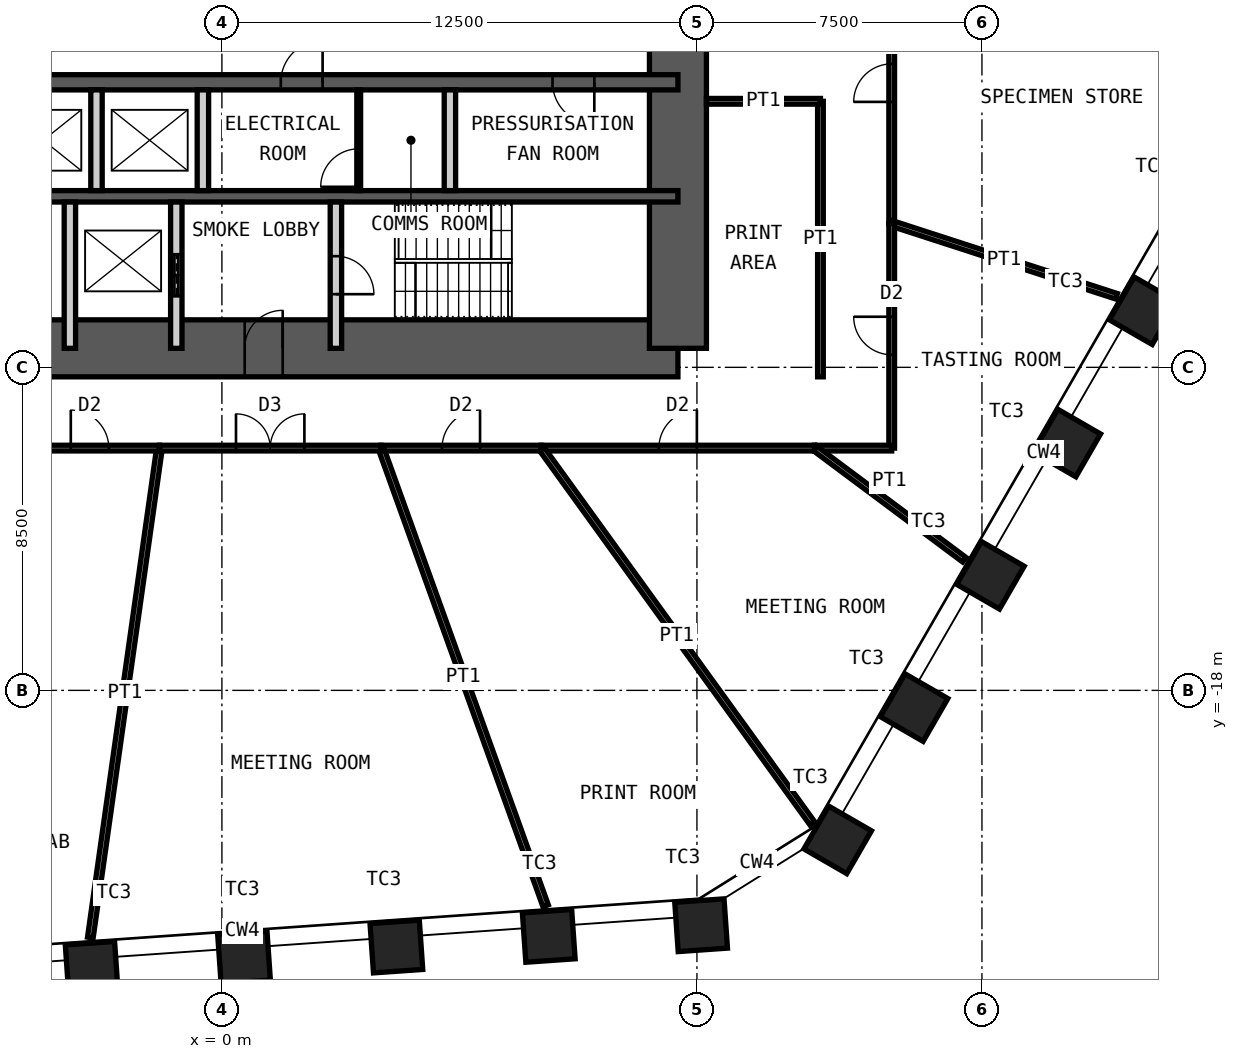
"""IFC4 building model, lengths in metres.
Left out: names, types, materials, properties, quantities, classifications, styles, units other than length and angle.
Written with IfcOpenShell. Run it as: python <this file> out.ifc"""

import sys

from ifc_helpers import new_model, si_unit, direction, frame, frame_2d, origin, origin_2d, place, context, subcontext, project, spatial, rectangle, hollow_rectangle, extrude, element, fill, save


model = new_model("IFC4")
c1 = context("Model", 3, precision=1e-05, world=origin(), true_north=direction((0.0, 1.0)))
c2 = subcontext(c1, "Body", "Model", "MODEL_VIEW")
j1 = project(units=[si_unit("LENGTHUNIT", "METRE"), si_unit("PLANEANGLEUNIT", "RADIAN")], contexts=[c1])
p1 = place(None, origin())
s1 = spatial("IfcSite", under=j1, at=p1, CompositionType="ELEMENT")
p2 = place(p1, origin())
s2 = spatial("IfcBuilding", under=s1, at=p2, CompositionType="ELEMENT")
p3 = place(p2, frame((0.0, 0.0, 124.0)))
s3 = spatial("IfcBuildingStorey", under=s2, at=p3, CompositionType="ELEMENT", Elevation=124.0)
for number, where, z_axis, x_axis in (
    (1, (24.242, -8.011, 0.0), (0.0, 0.0, 1.0), (0.5, 0.866, 0.0)),
    (2, (22.233, -11.491, 0.0), (0.0, 0.0, 1.0), (0.5, 0.866, 0.0)),
    (3, (20.223, -14.972, 0.0), (0.0, 0.0, 1.0), (0.5, 0.866, 0.0)),
    (4, (18.214, -18.453, 0.0), (0.0, 0.0, 1.0), (0.5, 0.866, 0.0)),
    (5, (16.204, -21.933, 0.0), (0.0, 0.0, 1.0), (0.5, 0.866, 0.0)),
    (6, (12.61, -24.179, 0.0), (0.0, 0.0, 1.0), (0.998, 0.07, 0.0)),
    (7, (8.601, -24.46, 0.0), (0.0, 0.0, 1.0), (0.998, 0.07, 0.0)),
    (8, (4.592, -24.74, 0.0), (0.0, 0.0, 1.0), (0.998, 0.07, 0.0)),
    (9, (0.582, -25.02, 0.0), (0.0, 0.0, 1.0), (0.998, 0.07, 0.0)),
    (10, (-3.427, -25.301, 0.0), (0.0, 0.0, 1.0), (0.998, 0.07, 0.0)),
):
    element("IfcColumn", number, at=place(p3, frame(where, z_axis=z_axis, x_axis=x_axis)), inside=s3, PredefinedType="COLUMN", context=c2, shape_type="SweptSolid", body=[
        extrude(hollow_rectangle(XDim=1.3, YDim=1.3, WallThickness=0.1, at=origin_2d()), origin(), (0.0, 0.0, 1.0), 4.2),
    ])
p4 = place(p3, frame((-12.0, -9.0, 0.0), z_axis=(0.0, 0.0, 1.0), x_axis=(1.0, 0.0, 0.0)))
e11 = element("IfcWall", 11, at=p4, inside=s3, PredefinedType="SHEAR", context=c2, shape_type="SweptSolid", body=[
    extrude(rectangle(XDim=24.0, YDim=1.5, at=frame_2d((12.0, 0.0))), origin(), (0.0, 0.0, 1.0), 4.2),
])
p5 = place(p4, frame((1.35, 0.0, 0.0)))
e12 = element("IfcOpeningElement", 12, at=p5, cuts=e11, PredefinedType="OPENING", context=c2, shape_type="SweptSolid", body=[
    extrude(rectangle(XDim=1.0, YDim=2.1, at=frame_2d((0.5, 1.05))), frame((0.0, 0.76, 0.0), z_axis=(0.0, -1.0, 0.0), x_axis=(1.0, 0.0, 0.0)), (0.0, 0.0, 1.0), 1.52),
])
p6 = place(p4, frame((5.325, 0.0, 0.0)))
e13 = element("IfcOpeningElement", 13, at=p6, cuts=e11, PredefinedType="OPENING", context=c2, shape_type="SweptSolid", body=[
    extrude(rectangle(XDim=1.15, YDim=2.1, at=frame_2d((0.575, 1.05))), frame((0.0, 0.76, 0.0), z_axis=(0.0, -1.0, 0.0), x_axis=(1.0, 0.0, 0.0)), (0.0, 0.0, 1.0), 1.52),
])
p7 = place(p4, frame((12.6, 0.0, 0.0)))
e14 = element("IfcOpeningElement", 14, at=p7, cuts=e11, PredefinedType="OPENING", context=c2, shape_type="SweptSolid", body=[
    extrude(rectangle(XDim=1.0, YDim=2.1, at=frame_2d((0.5, 1.05))), frame((0.0, 0.76, 0.0), z_axis=(0.0, -1.0, 0.0), x_axis=(1.0, 0.0, 0.0)), (0.0, 0.0, 1.0), 1.52),
])
p8 = place(p3, frame((12.0, -9.0, 0.0), z_axis=(0.0, 0.0, 1.0), x_axis=(0.0, 1.0, 0.0)))
e15 = element("IfcWall", 15, at=p8, inside=s3, PredefinedType="SHEAR", context=c2, shape_type="SweptSolid", body=[
    extrude(rectangle(XDim=18.0, YDim=1.5, at=frame_2d((9.0, 0.0))), origin(), (0.0, 0.0, 1.0), 4.2),
])
p9 = place(p8, frame((8.1, 0.0, 0.0)))
e16 = element("IfcOpeningElement", 16, at=p9, cuts=e15, PredefinedType="OPENING", context=c2, shape_type="SweptSolid", body=[
    extrude(rectangle(XDim=1.8, YDim=2.1, at=frame_2d((0.9, 1.05))), frame((0.0, 0.76, 0.0), z_axis=(0.0, -1.0, 0.0), x_axis=(1.0, 0.0, 0.0)), (0.0, 0.0, 1.0), 1.52),
])
p10 = place(p3, frame((-12.0, -2.0, 0.0), z_axis=(0.0, 0.0, 1.0), x_axis=(1.0, 0.0, 0.0)))
e17 = element("IfcWall", 17, at=p10, inside=s3, PredefinedType="SHEAR", context=c2, shape_type="SweptSolid", body=[
    extrude(rectangle(XDim=24.0, YDim=0.4, at=frame_2d((12.0, 0.0))), origin(), (0.0, 0.0, 1.0), 4.2),
])
p11 = place(p10, frame((1.1, 0.0, 0.0)))
e18 = element("IfcOpeningElement", 18, at=p11, cuts=e17, PredefinedType="OPENING", context=c2, shape_type="SweptSolid", body=[
    extrude(rectangle(XDim=1.1, YDim=2.1, at=frame_2d((0.55, 1.05))), frame((0.0, 0.21, 0.0), z_axis=(0.0, -1.0, 0.0), x_axis=(1.0, 0.0, 0.0)), (0.0, 0.0, 1.0), 0.42),
])
p12 = place(p10, frame((13.55, 0.0, 0.0)))
e19 = element("IfcOpeningElement", 19, at=p12, cuts=e17, PredefinedType="OPENING", context=c2, shape_type="SweptSolid", body=[
    extrude(rectangle(XDim=1.1, YDim=2.1, at=frame_2d((0.55, 1.05))), frame((0.0, 0.21, 0.0), z_axis=(0.0, -1.0, 0.0), x_axis=(1.0, 0.0, 0.0)), (0.0, 0.0, 1.0), 0.42),
])
p13 = place(p10, frame((20.7, 0.0, 0.0)))
e20 = element("IfcOpeningElement", 20, at=p13, cuts=e17, PredefinedType="OPENING", context=c2, shape_type="SweptSolid", body=[
    extrude(rectangle(XDim=1.1, YDim=2.1, at=frame_2d((0.55, 1.05))), frame((0.0, 0.21, 0.0), z_axis=(0.0, -1.0, 0.0), x_axis=(1.0, 0.0, 0.0)), (0.0, 0.0, 1.0), 0.42),
])
p14 = place(p10, frame((4.0, 0.0, 0.0)))
e21 = element("IfcOpeningElement", 21, at=p14, cuts=e17, PredefinedType="OPENING", context=c2, shape_type="SweptSolid", body=[
    extrude(rectangle(XDim=1.0, YDim=2.1, at=frame_2d((0.5, 1.05))), frame((0.0, 0.21, 0.0), z_axis=(0.0, -1.0, 0.0), x_axis=(1.0, 0.0, 0.0)), (0.0, 0.0, 1.0), 0.42),
])
p15 = place(p3, frame((-12.0, -5.0, 0.0), z_axis=(0.0, 0.0, 1.0), x_axis=(1.0, 0.0, 0.0)))
e22 = element("IfcWall", 22, at=p15, inside=s3, PredefinedType="SHEAR", context=c2, shape_type="SweptSolid", body=[
    extrude(rectangle(XDim=24.0, YDim=0.3, at=frame_2d((12.0, 0.0))), origin(), (0.0, 0.0, 1.0), 4.2),
])
for number, where, z_axis, x_axis in (
    (23, (-3.3, -4.85, 0.0), (0.0, 0.0, 1.0), (0.0, 1.0, 0.0)),
    (24, (-0.5, -4.85, 0.0), (0.0, 0.0, 1.0), (0.0, 1.0, 0.0)),
    (25, (6.0, -4.85, 0.0), (0.0, 0.0, 1.0), (0.0, 1.0, 0.0)),
):
    element("IfcWall", number, at=place(p3, frame(where, z_axis=z_axis, x_axis=x_axis)), inside=s3, PredefinedType="PARTITIONING", context=c2, shape_type="SweptSolid", body=[
        extrude(rectangle(XDim=2.65, YDim=0.3, at=frame_2d((1.325, 0.0))), origin(), (0.0, 0.0, 1.0), 3.98),
    ])
p16 = place(p3, frame((-4.0, -9.0, 0.0), z_axis=(0.0, 0.0, 1.0), x_axis=(0.0, 1.0, 0.0)))
e26 = element("IfcWall", 26, at=p16, inside=s3, PredefinedType="PARTITIONING", context=c2, shape_type="SweptSolid", body=[
    extrude(rectangle(XDim=3.85, YDim=0.3, at=frame_2d((1.925, 0.0))), origin(), (0.0, 0.0, 1.0), 3.98),
])
p17 = place(p3, frame((-1.2, -9.0, 0.0), z_axis=(0.0, 0.0, 1.0), x_axis=(0.0, 1.0, 0.0)))
e27 = element("IfcWall", 27, at=p17, inside=s3, PredefinedType="PARTITIONING", context=c2, shape_type="SweptSolid", body=[
    extrude(rectangle(XDim=3.85, YDim=0.3, at=frame_2d((1.925, 0.0))), origin(), (0.0, 0.0, 1.0), 3.98),
])
p18 = place(p17, frame((1.375, 0.0, 0.0)))
e28 = element("IfcOpeningElement", 28, at=p18, cuts=e27, PredefinedType="OPENING", context=c2, shape_type="SweptSolid", body=[
    extrude(rectangle(XDim=1.1, YDim=2.4, at=frame_2d((0.55, 1.2))), frame((0.0, 0.16, 0.0), z_axis=(0.0, -1.0, 0.0), x_axis=(1.0, 0.0, 0.0)), (0.0, 0.0, 1.0), 0.32),
])
p19 = place(p3, frame((3.0, -9.0, 0.0), z_axis=(0.0, 0.0, 1.0), x_axis=(0.0, 1.0, 0.0)))
e29 = element("IfcWall", 29, at=p19, inside=s3, PredefinedType="PARTITIONING", context=c2, shape_type="SweptSolid", body=[
    extrude(rectangle(XDim=3.85, YDim=0.3, at=frame_2d((1.925, 0.0))), origin(), (0.0, 0.0, 1.0), 3.98),
])
p20 = place(p19, frame((1.425, 0.0, 0.0)))
e30 = element("IfcOpeningElement", 30, at=p20, cuts=e29, PredefinedType="OPENING", context=c2, shape_type="SweptSolid", body=[
    extrude(rectangle(XDim=1.0, YDim=2.1, at=frame_2d((0.5, 1.05))), frame((0.0, 0.16, 0.0), z_axis=(0.0, -1.0, 0.0), x_axis=(1.0, 0.0, 0.0)), (0.0, 0.0, 1.0), 0.32),
])
p21 = place(p3, frame((3.6, -4.85, 0.0), z_axis=(0.0, 0.0, 1.0), x_axis=(0.0, 1.0, 0.0)))
e31 = element("IfcWall", 31, at=p21, inside=s3, PredefinedType="PARTITIONING", context=c2, shape_type="SweptSolid", body=[
    extrude(rectangle(XDim=2.65, YDim=0.1, at=frame_2d((1.325, 0.0))), origin(), (0.0, 0.0, 1.0), 3.98),
])
p22 = place(p21, frame((0.1, 0.0, 0.0)))
e32 = element("IfcOpeningElement", 32, at=p22, cuts=e31, PredefinedType="OPENING", context=c2, shape_type="SweptSolid", body=[
    extrude(rectangle(XDim=1.0, YDim=2.4, at=frame_2d((0.5, 1.2))), frame((0.0, 0.06, 0.0), z_axis=(0.0, -1.0, 0.0), x_axis=(1.0, 0.0, 0.0)), (0.0, 0.0, 1.0), 0.12),
])
p23 = place(p3, frame((-3.462, -24.503, 0.0), z_axis=(0.0, 0.0, 1.0), x_axis=(0.139899618934, 0.990165691499, 0.0)))
e33 = element("IfcWall", 33, at=p23, inside=s3, PredefinedType="PARTITIONING", context=c2, shape_type="SweptSolid", body=[
    extrude(rectangle(XDim=13.006, YDim=0.15, at=frame_2d((6.503, 0.0))), origin(), (0.0, 0.0, 1.0), 3.33),
])
p24 = place(p3, frame((-1.642, -11.625, 0.0), z_axis=(0.0, 0.0, 1.0), x_axis=(-1.0, 0.0, 0.0)))
e34 = element("IfcWall", 34, at=p24, inside=s3, PredefinedType="PARTITIONING", context=c2, shape_type="SweptSolid", body=[
    extrude(rectangle(XDim=3.668, YDim=0.15, at=frame_2d((1.834, 0.0))), origin(), (0.0, 0.0, 1.0), 4.03),
])
p25 = place(p24, frame((1.334, 0.0, 0.0)))
e35 = element("IfcOpeningElement", 35, at=p25, cuts=e34, PredefinedType="OPENING", context=c2, shape_type="SweptSolid", body=[
    extrude(rectangle(XDim=1.0, YDim=2.4, at=frame_2d((0.5, 1.2))), frame((0.0, 0.085, 0.0), z_axis=(0.0, -1.0, 0.0), x_axis=(1.0, 0.0, 0.0)), (0.0, 0.0, 1.0), 0.17),
])
p26 = place(p3, frame((17.625, 1.681, 0.0), z_axis=(0.0, 0.0, 1.0), x_axis=(0.0, -1.0, 0.0)))
e36 = element("IfcWall", 36, at=p26, inside=s3, PredefinedType="PARTITIONING", context=c2, shape_type="SweptSolid", body=[
    extrude(rectangle(XDim=7.394, YDim=0.15, at=frame_2d((3.697, 0.0))), origin(), (0.0, 0.0, 1.0), 4.03),
])
p27 = place(p26, frame((3.197, 0.0, 0.0)))
e37 = element("IfcOpeningElement", 37, at=p27, cuts=e36, PredefinedType="OPENING", context=c2, shape_type="SweptSolid", body=[
    extrude(rectangle(XDim=1.0, YDim=2.4, at=frame_2d((0.5, 1.2))), frame((0.0, 0.085, 0.0), z_axis=(0.0, -1.0, 0.0), x_axis=(1.0, 0.0, 0.0)), (0.0, 0.0, 1.0), 0.17),
])
p28 = place(p3, frame((23.541, -7.63, 0.0), z_axis=(0.0, 0.0, 1.0), x_axis=(-0.951280715006, 0.308326128081, 0.0)))
e38 = element("IfcWall", 38, at=p28, inside=s3, PredefinedType="PARTITIONING", context=c2, shape_type="SweptSolid", body=[
    extrude(rectangle(XDim=6.219, YDim=0.15, at=frame_2d((3.109, 0.0))), origin(), (0.0, 0.0, 1.0), 3.33),
])
p29 = place(p3, frame((17.625, -5.713, 0.0), z_axis=(0.0, 0.0, 1.0), x_axis=(0.0, -1.0, 0.0)))
e39 = element("IfcWall", 39, at=p29, inside=s3, PredefinedType="PARTITIONING", context=c2, shape_type="SweptSolid", body=[
    extrude(rectangle(XDim=5.912, YDim=0.15, at=frame_2d((2.956, 0.0))), origin(), (0.0, 0.0, 1.0), 4.03),
])
p30 = place(p29, frame((2.456, 0.0, 0.0)))
e40 = element("IfcOpeningElement", 40, at=p30, cuts=e39, PredefinedType="OPENING", context=c2, shape_type="SweptSolid", body=[
    extrude(rectangle(XDim=1.0, YDim=2.4, at=frame_2d((0.5, 1.2))), frame((0.0, 0.085, 0.0), z_axis=(0.0, -1.0, 0.0), x_axis=(1.0, 0.0, 0.0)), (0.0, 0.0, 1.0), 0.17),
])
p31 = place(p3, frame((17.625, -11.625, 0.0), z_axis=(0.0, 0.0, 1.0), x_axis=(-1.0, 0.0, 0.0)))
e41 = element("IfcWall", 41, at=p31, inside=s3, PredefinedType="PARTITIONING", context=c2, shape_type="SweptSolid", body=[
    extrude(rectangle(XDim=2.029, YDim=0.15, at=frame_2d((1.014, 0.0))), origin(), (0.0, 0.0, 1.0), 4.03),
])
p32 = place(p3, frame((19.537, -14.562, 0.0), z_axis=(0.0, 0.0, 1.0), x_axis=(-0.801778753003, 0.597620976233, 0.0)))
e42 = element("IfcWall", 42, at=p32, inside=s3, PredefinedType="PARTITIONING", context=c2, shape_type="SweptSolid", body=[
    extrude(rectangle(XDim=4.915, YDim=0.15, at=frame_2d((2.458, 0.0))), origin(), (0.0, 0.0, 1.0), 3.33),
])
p33 = place(p3, frame((15.596, -11.625, 0.0), z_axis=(0.0, 0.0, 1.0), x_axis=(-1.0, 0.0, 0.0)))
e43 = element("IfcWall", 43, at=p33, inside=s3, PredefinedType="PARTITIONING", context=c2, shape_type="SweptSolid", body=[
    extrude(rectangle(XDim=7.195, YDim=0.15, at=frame_2d((3.597, 0.0))), origin(), (0.0, 0.0, 1.0), 4.03),
])
p34 = place(p33, frame((3.097, 0.0, 0.0)))
e44 = element("IfcOpeningElement", 44, at=p34, cuts=e43, PredefinedType="OPENING", context=c2, shape_type="SweptSolid", body=[
    extrude(rectangle(XDim=1.0, YDim=2.4, at=frame_2d((0.5, 1.2))), frame((0.0, 0.085, 0.0), z_axis=(0.0, -1.0, 0.0), x_axis=(1.0, 0.0, 0.0)), (0.0, 0.0, 1.0), 0.17),
])
p35 = place(p3, frame((15.54, -21.502, 0.0), z_axis=(0.0, 0.0, 1.0), x_axis=(-0.585731902034, 0.810504866697, 0.0)))
e45 = element("IfcWall", 45, at=p35, inside=s3, PredefinedType="PARTITIONING", context=c2, shape_type="SweptSolid", body=[
    extrude(rectangle(XDim=12.187, YDim=0.15, at=frame_2d((6.093, 0.0))), origin(), (0.0, 0.0, 1.0), 2.93),
])
p36 = place(p3, frame((8.401, -11.625, 0.0), z_axis=(0.0, 0.0, 1.0), x_axis=(-1.0, 0.0, 0.0)))
e46 = element("IfcWall", 46, at=p36, inside=s3, PredefinedType="PARTITIONING", context=c2, shape_type="SweptSolid", body=[
    extrude(rectangle(XDim=4.217, YDim=0.15, at=frame_2d((2.109, 0.0))), origin(), (0.0, 0.0, 1.0), 4.03),
])
p37 = place(p36, frame((1.609, 0.0, 0.0)))
e47 = element("IfcOpeningElement", 47, at=p37, cuts=e46, PredefinedType="OPENING", context=c2, shape_type="SweptSolid", body=[
    extrude(rectangle(XDim=1.0, YDim=2.4, at=frame_2d((0.5, 1.2))), frame((0.0, 0.085, 0.0), z_axis=(0.0, -1.0, 0.0), x_axis=(1.0, 0.0, 0.0)), (0.0, 0.0, 1.0), 0.17),
])
p38 = place(p3, frame((8.518, -23.667, 0.0), z_axis=(0.0, 0.0, 1.0), x_axis=(-0.338635030469, 0.940917805198, 0.0)))
e48 = element("IfcWall", 48, at=p38, inside=s3, PredefinedType="PARTITIONING", context=c2, shape_type="SweptSolid", body=[
    extrude(rectangle(XDim=12.798, YDim=0.15, at=frame_2d((6.399, 0.0))), origin(), (0.0, 0.0, 1.0), 3.33),
])
p39 = place(p3, frame((4.184, -11.625, 0.0), z_axis=(0.0, 0.0, 1.0), x_axis=(-1.0, 0.0, 0.0)))
e49 = element("IfcWall", 49, at=p39, inside=s3, PredefinedType="PARTITIONING", context=c2, shape_type="SweptSolid", body=[
    extrude(rectangle(XDim=5.826, YDim=0.15, at=frame_2d((2.913, 0.0))), origin(), (0.0, 0.0, 1.0), 4.03),
])
p40 = place(p39, frame((2.013, 0.0, 0.0)))
e50 = element("IfcOpeningElement", 50, at=p40, cuts=e49, PredefinedType="OPENING", context=c2, shape_type="SweptSolid", body=[
    extrude(rectangle(XDim=1.8, YDim=2.4, at=frame_2d((0.9, 1.2))), frame((0.0, 0.085, 0.0), z_axis=(0.0, -1.0, 0.0), x_axis=(1.0, 0.0, 0.0)), (0.0, 0.0, 1.0), 0.17),
])
p41 = place(p3, frame((15.75, -9.75, 0.0), z_axis=(0.0, 0.0, 1.0), x_axis=(0.0, 1.0, 0.0)))
e51 = element("IfcWall", 51, at=p41, inside=s3, PredefinedType="PARTITIONING", context=c2, shape_type="SweptSolid", body=[
    extrude(rectangle(XDim=7.25, YDim=0.15, at=frame_2d((3.625, 0.0))), origin(), (0.0, 0.0, 1.0), 4.03),
])
p42 = place(p3, frame((12.75, -2.5, 0.0), z_axis=(0.0, 0.0, 1.0), x_axis=(1.0, 0.0, 0.0)))
e52 = element("IfcWall", 52, at=p42, inside=s3, PredefinedType="PARTITIONING", context=c2, shape_type="SweptSolid", body=[
    extrude(rectangle(XDim=3.0, YDim=0.15, at=frame_2d((1.5, 0.0))), origin(), (0.0, 0.0, 1.0), 3.33),
])
p43 = place(p7, origin())
e53 = element("IfcDoor", 53, at=p43, inside=s3, OperationType="SINGLE_SWING_LEFT", PredefinedType="DOOR", context=c2, shape_type="SweptSolid", body=[
    extrude(rectangle(XDim=1.0, YDim=2.1, at=frame_2d((0.5, 1.05))), frame((0.0, 0.025, 0.0), z_axis=(0.0, -1.0, 0.0), x_axis=(1.0, 0.0, 0.0)), (0.0, 0.0, 1.0), 0.05),
])
fill(e14, e53)
p44 = place(p20, origin())
e54 = element("IfcDoor", 54, at=p44, inside=s3, OperationType="SINGLE_SWING_LEFT", PredefinedType="DOOR", context=c2, shape_type="SweptSolid", body=[
    extrude(rectangle(XDim=1.0, YDim=2.1, at=frame_2d((0.5, 1.05))), frame((0.0, 0.025, 0.0), z_axis=(0.0, -1.0, 0.0), x_axis=(1.0, 0.0, 0.0)), (0.0, 0.0, 1.0), 0.05),
])
fill(e30, e54)
p45 = place(p12, origin())
e55 = element("IfcDoor", 55, at=p45, inside=s3, OperationType="SINGLE_SWING_LEFT", PredefinedType="DOOR", context=c2, shape_type="SweptSolid", body=[
    extrude(rectangle(XDim=1.1, YDim=2.1, at=frame_2d((0.55, 1.05))), frame((0.0, 0.025, 0.0), z_axis=(0.0, -1.0, 0.0), x_axis=(1.0, 0.0, 0.0)), (0.0, 0.0, 1.0), 0.05),
])
fill(e19, e55)
p46 = place(p13, origin())
e56 = element("IfcDoor", 56, at=p46, inside=s3, OperationType="SINGLE_SWING_RIGHT", PredefinedType="DOOR", context=c2, shape_type="SweptSolid", body=[
    extrude(rectangle(XDim=1.1, YDim=2.1, at=frame_2d((0.55, 1.05))), frame((0.0, 0.025, 0.0), z_axis=(0.0, -1.0, 0.0), x_axis=(1.0, 0.0, 0.0)), (0.0, 0.0, 1.0), 0.05),
])
fill(e20, e56)
p47 = place(p18, origin())
e57 = element("IfcDoor", 57, at=p47, inside=s3, OperationType="DOUBLE_DOOR_SLIDING", PredefinedType="DOOR", context=c2, shape_type="SweptSolid", body=[
    extrude(rectangle(XDim=1.1, YDim=2.4, at=frame_2d((0.55, 1.2))), frame((0.0, 0.025, 0.0), z_axis=(0.0, -1.0, 0.0), x_axis=(1.0, 0.0, 0.0)), (0.0, 0.0, 1.0), 0.05),
])
fill(e28, e57)
p48 = place(p22, origin())
e58 = element("IfcDoor", 58, at=p48, inside=s3, OperationType="SINGLE_SWING_RIGHT", PredefinedType="DOOR", context=c2, shape_type="SweptSolid", body=[
    extrude(rectangle(XDim=1.0, YDim=2.4, at=frame_2d((0.5, 1.2))), frame((0.0, 0.025, 0.0), z_axis=(0.0, -1.0, 0.0), x_axis=(1.0, 0.0, 0.0)), (0.0, 0.0, 1.0), 0.05),
])
fill(e32, e58)
p49 = place(p25, origin())
e59 = element("IfcDoor", 59, at=p49, inside=s3, OperationType="SINGLE_SWING_RIGHT", PredefinedType="DOOR", context=c2, shape_type="SweptSolid", body=[
    extrude(rectangle(XDim=1.0, YDim=2.4, at=frame_2d((0.5, 1.2))), frame((0.0, 0.025, 0.0), z_axis=(0.0, -1.0, 0.0), x_axis=(1.0, 0.0, 0.0)), (0.0, 0.0, 1.0), 0.05),
])
fill(e35, e59)
p50 = place(p27, origin())
e60 = element("IfcDoor", 60, at=p50, inside=s3, OperationType="SINGLE_SWING_RIGHT", PredefinedType="DOOR", context=c2, shape_type="SweptSolid", body=[
    extrude(rectangle(XDim=1.0, YDim=2.4, at=frame_2d((0.5, 1.2))), frame((0.0, 0.025, 0.0), z_axis=(0.0, -1.0, 0.0), x_axis=(1.0, 0.0, 0.0)), (0.0, 0.0, 1.0), 0.05),
])
fill(e37, e60)
p51 = place(p30, origin())
e61 = element("IfcDoor", 61, at=p51, inside=s3, OperationType="SINGLE_SWING_LEFT", PredefinedType="DOOR", context=c2, shape_type="SweptSolid", body=[
    extrude(rectangle(XDim=1.0, YDim=2.4, at=frame_2d((0.5, 1.2))), frame((0.0, 0.025, 0.0), z_axis=(0.0, -1.0, 0.0), x_axis=(1.0, 0.0, 0.0)), (0.0, 0.0, 1.0), 0.05),
])
fill(e40, e61)
p52 = place(p34, origin())
e62 = element("IfcDoor", 62, at=p52, inside=s3, OperationType="SINGLE_SWING_LEFT", PredefinedType="DOOR", context=c2, shape_type="SweptSolid", body=[
    extrude(rectangle(XDim=1.0, YDim=2.4, at=frame_2d((0.5, 1.2))), frame((0.0, 0.025, 0.0), z_axis=(0.0, -1.0, 0.0), x_axis=(1.0, 0.0, 0.0)), (0.0, 0.0, 1.0), 0.05),
])
fill(e44, e62)
p53 = place(p37, origin())
e63 = element("IfcDoor", 63, at=p53, inside=s3, OperationType="SINGLE_SWING_LEFT", PredefinedType="DOOR", context=c2, shape_type="SweptSolid", body=[
    extrude(rectangle(XDim=1.0, YDim=2.4, at=frame_2d((0.5, 1.2))), frame((0.0, 0.025, 0.0), z_axis=(0.0, -1.0, 0.0), x_axis=(1.0, 0.0, 0.0)), (0.0, 0.0, 1.0), 0.05),
])
fill(e47, e63)
p54 = place(p40, origin())
e64 = element("IfcDoor", 64, at=p54, inside=s3, OperationType="DOUBLE_DOOR_DOUBLE_SWING", PredefinedType="DOOR", context=c2, shape_type="SweptSolid", body=[
    extrude(rectangle(XDim=1.8, YDim=2.4, at=frame_2d((0.9, 1.2))), frame((0.0, 0.025, 0.0), z_axis=(0.0, -1.0, 0.0), x_axis=(1.0, 0.0, 0.0)), (0.0, 0.0, 1.0), 0.05),
])
fill(e50, e64)
save(model, sys.argv[1])
